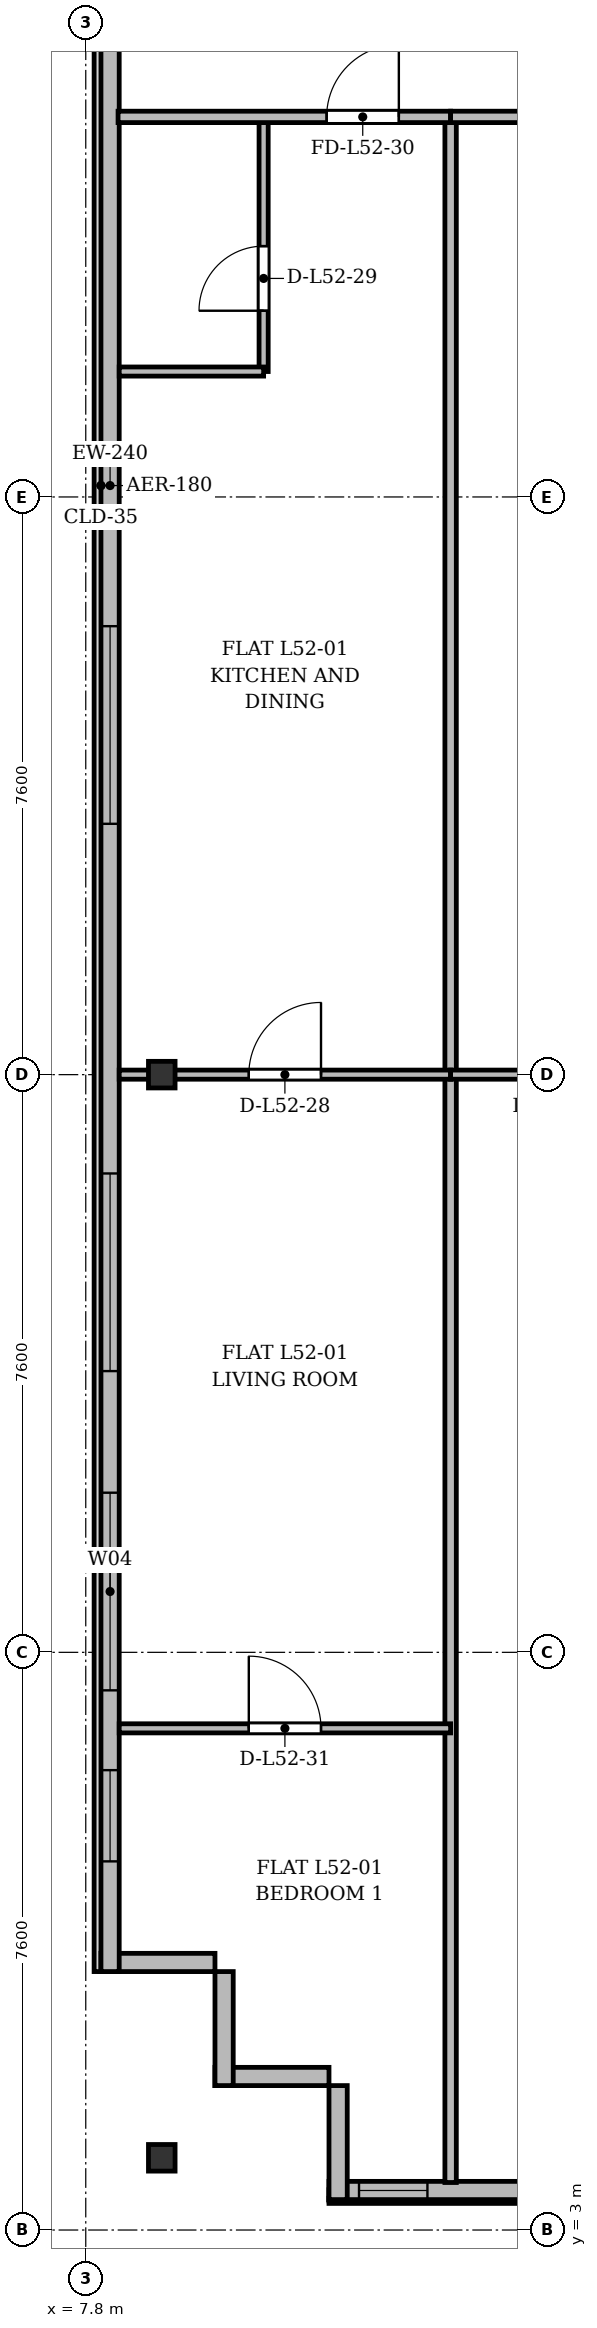
"""IFC4 building model, lengths in metres.
Left out: names, types, materials, properties, quantities, classifications, styles, units other than length and angle.
Written with IfcOpenShell. Run it as: python <this file> out.ifc"""

import sys

from ifc_helpers import new_model, si_unit, direction, frame, frame_2d, origin, origin_2d, place, context, subcontext, project, spatial, rectangle, i_section, extrude, source, transform, mapped, element, fill, save


model = new_model("IFC4")
c1 = context("Model", 3, precision=1e-05, world=origin(), true_north=direction((0.0, 1.0)))
c2 = subcontext(c1, "Body", "Model", "MODEL_VIEW")
j1 = project(units=[si_unit("LENGTHUNIT", "METRE"), si_unit("PLANEANGLEUNIT", "RADIAN")], contexts=[c1])
p1 = place(None, origin())
s1 = spatial("IfcSite", under=j1, at=p1, CompositionType="ELEMENT")
p2 = place(p1, origin())
s2 = spatial("IfcBuilding", under=s1, at=p2, CompositionType="ELEMENT")
p3 = place(p2, frame((0.0, 0.0, 201.3)))
s3 = spatial("IfcBuildingStorey", under=s2, at=p3, CompositionType="ELEMENT", Elevation=201.3)
m1 = source(origin(), c2, "Body", "SweptSolid", [
    extrude(i_section(OverallWidth=0.35, OverallDepth=0.35, WebThickness=0.018, FlangeThickness=0.028, at=origin_2d()), origin(), (0.0, 0.0, 1.0), 3.6),
])
for number, where, z_axis, x_axis in (
    (1, (8.8, 3.95, 0.0), (0.0, 0.0, 1.0), (1.0, 0.0, 0.0)),
    (2, (8.8, 18.2, 0.0), (0.0, 0.0, 1.0), (1.0, 0.0, 0.0)),
):
    element("IfcColumn", number, at=place(p3, frame(where, z_axis=z_axis, x_axis=x_axis)), inside=s3, PredefinedType="COLUMN", context=c2, shape_type="MappedRepresentation", body=[
        mapped(m1, transform((0.0, 0.0, 0.0), x_axis=(1.0, 0.0, 0.0), y_axis=(0.0, 1.0, 0.0), z_axis=(0.0, 0.0, 1.0), scale=1.0)),
    ])
for number, where, z_axis, x_axis in (
    (3, (11.0, 5.02, 0.0), (0.0, 0.0, 1.0), (-1.0, 0.0, 0.0)),
    (4, (9.62, 4.9, 0.0), (0.0, 0.0, 1.0), (0.0, 1.0, 0.0)),
):
    element("IfcWall", number, at=place(p3, frame(where, z_axis=z_axis, x_axis=x_axis)), inside=s3, PredefinedType="SOLIDWALL", context=c2, shape_type="SweptSolid", body=[
        extrude(rectangle(XDim=1.5, YDim=0.24, at=frame_2d((0.75, 0.0))), origin(), (0.0, 0.0, 1.0), 3.22),
    ])
p4 = place(p3, frame((9.5, 6.52, 0.0), z_axis=(0.0, 0.0, 1.0), x_axis=(-1.0, 0.0, 0.0)))
e5 = element("IfcWall", 5, at=p4, inside=s3, PredefinedType="SOLIDWALL", context=c2, shape_type="SweptSolid", body=[
    extrude(rectangle(XDim=1.5, YDim=0.24, at=frame_2d((0.75, 0.0))), origin(), (0.0, 0.0, 1.0), 2.72),
])
p5 = place(p3, frame((8.12, 6.4, 0.0), z_axis=(0.0, 0.0, 1.0), x_axis=(0.0, 1.0, 0.0)))
e6 = element("IfcWall", 6, at=p5, inside=s3, PredefinedType="SOLIDWALL", context=c2, shape_type="SweptSolid", body=[
    extrude(rectangle(XDim=39.1, YDim=0.24, at=frame_2d((19.55, 0.0))), origin(), (0.0, 0.0, 1.0), 3.22),
])
p6 = place(p5, frame((1.45, 0.0, 0.92)))
e7 = element("IfcOpeningElement", 7, at=p6, cuts=e6, PredefinedType="OPENING", context=c2, shape_type="SweptSolid", body=[
    extrude(rectangle(XDim=1.2, YDim=1.65, at=frame_2d((0.6, 0.825))), frame((0.0, 0.13, 0.0), z_axis=(0.0, -1.0, 0.0), x_axis=(1.0, 0.0, 0.0)), (0.0, 0.0, 1.0), 0.26),
])
p7 = place(p5, frame((3.7, 0.0, 0.92)))
e8 = element("IfcOpeningElement", 8, at=p7, cuts=e6, PredefinedType="OPENING", context=c2, shape_type="SweptSolid", body=[
    extrude(rectangle(XDim=2.6, YDim=1.9, at=frame_2d((1.3, 0.95))), frame((0.0, 0.13, 0.0), z_axis=(0.0, -1.0, 0.0), x_axis=(1.0, 0.0, 0.0)), (0.0, 0.0, 1.0), 0.26),
])
p8 = place(p5, frame((7.9, 0.0, 0.92)))
e9 = element("IfcOpeningElement", 9, at=p8, cuts=e6, PredefinedType="OPENING", context=c2, shape_type="SweptSolid", body=[
    extrude(rectangle(XDim=2.6, YDim=1.9, at=frame_2d((1.3, 0.95))), frame((0.0, 0.13, 0.0), z_axis=(0.0, -1.0, 0.0), x_axis=(1.0, 0.0, 0.0)), (0.0, 0.0, 1.0), 0.26),
])
p9 = place(p5, frame((15.1, 0.0, 0.92)))
e10 = element("IfcOpeningElement", 10, at=p9, cuts=e6, PredefinedType="OPENING", context=c2, shape_type="SweptSolid", body=[
    extrude(rectangle(XDim=2.6, YDim=1.9, at=frame_2d((1.3, 0.95))), frame((0.0, 0.13, 0.0), z_axis=(0.0, -1.0, 0.0), x_axis=(1.0, 0.0, 0.0)), (0.0, 0.0, 1.0), 0.26),
])
p10 = place(p5, frame((33.4, 0.0, 0.92)))
e11 = element("IfcOpeningElement", 11, at=p10, cuts=e6, PredefinedType="OPENING", context=c2, shape_type="SweptSolid", body=[
    extrude(rectangle(XDim=1.2, YDim=1.65, at=frame_2d((0.6, 0.825))), frame((0.0, 0.13, 0.0), z_axis=(0.0, -1.0, 0.0), x_axis=(1.0, 0.0, 0.0)), (0.0, 0.0, 1.0), 0.26),
])
p11 = place(p5, frame((36.75, 0.0, 0.92)))
e12 = element("IfcOpeningElement", 12, at=p11, cuts=e6, PredefinedType="OPENING", context=c2, shape_type="SweptSolid", body=[
    extrude(rectangle(XDim=1.2, YDim=1.65, at=frame_2d((0.6, 0.825))), frame((0.0, 0.13, 0.0), z_axis=(0.0, -1.0, 0.0), x_axis=(1.0, 0.0, 0.0)), (0.0, 0.0, 1.0), 0.26),
])
p12 = place(p3, frame((30.6, 3.52, 0.0), z_axis=(0.0, 0.0, 1.0), x_axis=(-1.0, 0.0, 0.0)))
e13 = element("IfcWall", 13, at=p12, inside=s3, PredefinedType="SOLIDWALL", context=c2, shape_type="SweptSolid", body=[
    extrude(rectangle(XDim=19.6, YDim=0.24, at=frame_2d((9.8, 0.0))), origin(), (0.0, 0.0, 1.0), 3.22),
])
p13 = place(p12, frame((1.695, 0.0, 0.9)))
e14 = element("IfcOpeningElement", 14, at=p13, cuts=e13, PredefinedType="OPENING", context=c2, shape_type="SweptSolid", body=[
    extrude(rectangle(XDim=1.5, YDim=1.75, at=frame_2d((0.75, 0.875))), frame((0.0, 0.13, 0.0), z_axis=(0.0, -1.0, 0.0), x_axis=(1.0, 0.0, 0.0)), (0.0, 0.0, 1.0), 0.26),
])
p14 = place(p12, frame((5.2, 0.0, 0.9)))
e15 = element("IfcOpeningElement", 15, at=p14, cuts=e13, PredefinedType="OPENING", context=c2, shape_type="SweptSolid", body=[
    extrude(rectangle(XDim=2.0, YDim=1.95, at=frame_2d((1.0, 0.975))), frame((0.0, 0.13, 0.0), z_axis=(0.0, -1.0, 0.0), x_axis=(1.0, 0.0, 0.0)), (0.0, 0.0, 1.0), 0.26),
])
p15 = place(p12, frame((8.175, 0.0, 0.9)))
e16 = element("IfcOpeningElement", 16, at=p15, cuts=e13, PredefinedType="OPENING", context=c2, shape_type="SweptSolid", body=[
    extrude(rectangle(XDim=1.65, YDim=1.85, at=frame_2d((0.825, 0.925))), frame((0.0, 0.13, 0.0), z_axis=(0.0, -1.0, 0.0), x_axis=(1.0, 0.0, 0.0)), (0.0, 0.0, 1.0), 0.26),
])
p16 = place(p12, frame((10.65, 0.0, 0.9)))
e17 = element("IfcOpeningElement", 17, at=p16, cuts=e13, PredefinedType="OPENING", context=c2, shape_type="SweptSolid", body=[
    extrude(rectangle(XDim=1.5, YDim=1.75, at=frame_2d((0.75, 0.875))), frame((0.0, 0.13, 0.0), z_axis=(0.0, -1.0, 0.0), x_axis=(1.0, 0.0, 0.0)), (0.0, 0.0, 1.0), 0.26),
])
p17 = place(p12, frame((14.1, 0.0, 0.9)))
e18 = element("IfcOpeningElement", 18, at=p17, cuts=e13, PredefinedType="OPENING", context=c2, shape_type="SweptSolid", body=[
    extrude(rectangle(XDim=2.2, YDim=1.8, at=frame_2d((1.1, 0.9))), frame((0.0, 0.13, 0.0), z_axis=(0.0, -1.0, 0.0), x_axis=(1.0, 0.0, 0.0)), (0.0, 0.0, 1.0), 0.26),
])
p18 = place(p12, frame((18.305, 0.0, 0.9)))
e19 = element("IfcOpeningElement", 19, at=p18, cuts=e13, PredefinedType="OPENING", context=c2, shape_type="SweptSolid", body=[
    extrude(rectangle(XDim=0.9, YDim=1.65, at=frame_2d((0.45, 0.825))), frame((0.0, 0.13, 0.0), z_axis=(0.0, -1.0, 0.0), x_axis=(1.0, 0.0, 0.0)), (0.0, 0.0, 1.0), 0.26),
])
p19 = place(p3, frame((11.12, 3.4, 0.0), z_axis=(0.0, 0.0, 1.0), x_axis=(0.0, 1.0, 0.0)))
e20 = element("IfcWall", 20, at=p19, inside=s3, PredefinedType="SOLIDWALL", context=c2, shape_type="SweptSolid", body=[
    extrude(rectangle(XDim=1.5, YDim=0.24, at=frame_2d((0.75, 0.0))), origin(), (0.0, 0.0, 1.0), 2.77),
])
p20 = place(p3, frame((12.6, 3.625, 0.0), z_axis=(0.0, 0.0, 1.0), x_axis=(0.0, 1.0, 0.0)))
e21 = element("IfcWall", 21, at=p20, inside=s3, PredefinedType="PARTITIONING", context=c2, shape_type="SweptSolid", body=[
    extrude(rectangle(XDim=27.175, YDim=0.15, at=frame_2d((13.587, 0.0))), origin(), (0.0, 0.0, 1.0), 2.77),
])
p21 = place(p3, frame((8.24, 18.2, 0.0), z_axis=(0.0, 0.0, 1.0), x_axis=(1.0, 0.0, 0.0)))
e22 = element("IfcWall", 22, at=p21, inside=s3, PredefinedType="PARTITIONING", context=c2, shape_type="SweptSolid", body=[
    extrude(rectangle(XDim=4.36, YDim=0.12, at=frame_2d((2.18, 0.0))), origin(), (0.0, 0.0, 1.0), 2.77),
])
p22 = place(p21, frame((1.705, 0.0, 0.0)))
e23 = element("IfcOpeningElement", 23, at=p22, cuts=e22, PredefinedType="OPENING", context=c2, shape_type="SweptSolid", body=[
    extrude(rectangle(XDim=0.95, YDim=2.15, at=frame_2d((0.475, 1.075))), frame((0.0, 0.07, 0.0), z_axis=(0.0, -1.0, 0.0), x_axis=(1.0, 0.0, 0.0)), (0.0, 0.0, 1.0), 0.14),
])
p23 = place(p3, frame((10.14, 27.45, 0.0), z_axis=(0.0, 0.0, 1.0), x_axis=(0.0, 1.0, 0.0)))
e24 = element("IfcWall", 24, at=p23, inside=s3, PredefinedType="PARTITIONING", context=c2, shape_type="SweptSolid", body=[
    extrude(rectangle(XDim=3.35, YDim=0.12, at=frame_2d((1.675, 0.0))), origin(), (0.0, 0.0, 1.0), 3.22),
])
p24 = place(p23, frame((0.8, 0.0, 0.0)))
e25 = element("IfcOpeningElement", 25, at=p24, cuts=e24, PredefinedType="OPENING", context=c2, shape_type="SweptSolid", body=[
    extrude(rectangle(XDim=0.85, YDim=2.1, at=frame_2d((0.425, 1.05))), frame((0.0, 0.07, 0.0), z_axis=(0.0, -1.0, 0.0), x_axis=(1.0, 0.0, 0.0)), (0.0, 0.0, 1.0), 0.14),
])
p25 = place(p3, frame((8.24, 27.45, 0.0), z_axis=(0.0, 0.0, 1.0), x_axis=(1.0, 0.0, 0.0)))
e26 = element("IfcWall", 26, at=p25, inside=s3, PredefinedType="PARTITIONING", context=c2, shape_type="SweptSolid", body=[
    extrude(rectangle(XDim=1.9, YDim=0.12, at=frame_2d((0.95, 0.0))), origin(), (0.0, 0.0, 1.0), 2.72),
])
p26 = place(p3, frame((8.225, 30.8, 0.0), z_axis=(0.0, 0.0, 1.0), x_axis=(1.0, 0.0, 0.0)))
e27 = element("IfcWall", 27, at=p26, inside=s3, PredefinedType="PARTITIONING", context=c2, shape_type="SweptSolid", body=[
    extrude(rectangle(XDim=4.375, YDim=0.15, at=frame_2d((2.188, 0.0))), origin(), (0.0, 0.0, 1.0), 2.72),
])
p27 = place(p26, frame((2.744, 0.0, 0.0)))
e28 = element("IfcOpeningElement", 28, at=p27, cuts=e27, PredefinedType="OPENING", context=c2, shape_type="SweptSolid", body=[
    extrude(rectangle(XDim=0.95, YDim=2.15, at=frame_2d((0.475, 1.075))), frame((0.0, 0.085, 0.0), z_axis=(0.0, -1.0, 0.0), x_axis=(1.0, 0.0, 0.0)), (0.0, 0.0, 1.0), 0.17),
])
p28 = place(p3, frame((8.24, 9.6, 0.0), z_axis=(0.0, 0.0, 1.0), x_axis=(1.0, 0.0, 0.0)))
e29 = element("IfcWall", 29, at=p28, inside=s3, PredefinedType="PARTITIONING", context=c2, shape_type="SweptSolid", body=[
    extrude(rectangle(XDim=4.36, YDim=0.12, at=frame_2d((2.18, 0.0))), origin(), (0.0, 0.0, 1.0), 2.72),
])
p29 = place(p28, frame((1.705, 0.0, 0.0)))
e30 = element("IfcOpeningElement", 30, at=p29, cuts=e29, PredefinedType="OPENING", context=c2, shape_type="SweptSolid", body=[
    extrude(rectangle(XDim=0.95, YDim=2.15, at=frame_2d((0.475, 1.075))), frame((0.0, 0.07, 0.0), z_axis=(0.0, -1.0, 0.0), x_axis=(1.0, 0.0, 0.0)), (0.0, 0.0, 1.0), 0.14),
])
p30 = place(p3, frame((12.6, 30.8, 0.0), z_axis=(0.0, 0.0, 1.0), x_axis=(1.0, 0.0, 0.0)))
e31 = element("IfcWall", 31, at=p30, inside=s3, PredefinedType="PARTITIONING", context=c2, shape_type="SweptSolid", body=[
    extrude(rectangle(XDim=5.6, YDim=0.15, at=frame_2d((2.8, 0.0))), origin(), (0.0, 0.0, 1.0), 2.72),
])
p31 = place(p30, frame((2.232, 0.0, 0.0)))
e32 = element("IfcOpeningElement", 32, at=p31, cuts=e31, PredefinedType="OPENING", context=c2, shape_type="SweptSolid", body=[
    extrude(rectangle(XDim=0.95, YDim=2.15, at=frame_2d((0.475, 1.075))), frame((0.0, 0.085, 0.0), z_axis=(0.0, -1.0, 0.0), x_axis=(1.0, 0.0, 0.0)), (0.0, 0.0, 1.0), 0.17),
])
p32 = place(p3, frame((12.6, 18.2, 0.0), z_axis=(0.0, 0.0, 1.0), x_axis=(1.0, 0.0, 0.0)))
e33 = element("IfcWall", 33, at=p32, inside=s3, PredefinedType="PARTITIONING", context=c2, shape_type="SweptSolid", body=[
    extrude(rectangle(XDim=5.6, YDim=0.12, at=frame_2d((2.8, 0.0))), origin(), (0.0, 0.0, 1.0), 2.77),
])
p33 = place(p32, frame((0.936, 0.0, 0.0)))
e34 = element("IfcOpeningElement", 34, at=p33, cuts=e33, PredefinedType="OPENING", context=c2, shape_type="SweptSolid", body=[
    extrude(rectangle(XDim=0.95, YDim=2.15, at=frame_2d((0.475, 1.075))), frame((0.0, 0.07, 0.0), z_axis=(0.0, -1.0, 0.0), x_axis=(1.0, 0.0, 0.0)), (0.0, 0.0, 1.0), 0.14),
])
m2 = source(origin(), c2, "Body", "SweptSolid", [
    extrude(rectangle(XDim=1.2, YDim=1.65, at=frame_2d((0.6, 0.825))), frame((0.0, 0.03, 0.0), z_axis=(0.0, -1.0, 0.0), x_axis=(1.0, 0.0, 0.0)), (0.0, 0.0, 1.0), 0.06),
])
p34 = place(p6, origin())
e35 = element("IfcWindow", 35, at=p34, inside=s3, PartitioningType="SINGLE_PANEL", PredefinedType="WINDOW", context=c2, shape_type="MappedRepresentation", body=[
    mapped(m2, transform((0.0, 0.0, 0.0), x_axis=(1.0, 0.0, 0.0), y_axis=(0.0, 1.0, 0.0), z_axis=(0.0, 0.0, 1.0), scale=1.0)),
])
fill(e7, e35)
m3 = source(origin(), c2, "Body", "SweptSolid", [
    extrude(rectangle(XDim=2.6, YDim=1.9, at=frame_2d((1.3, 0.95))), frame((0.0, 0.03, 0.0), z_axis=(0.0, -1.0, 0.0), x_axis=(1.0, 0.0, 0.0)), (0.0, 0.0, 1.0), 0.06),
])
p35 = place(p7, origin())
e36 = element("IfcWindow", 36, at=p35, inside=s3, PartitioningType="SINGLE_PANEL", PredefinedType="WINDOW", context=c2, shape_type="MappedRepresentation", body=[
    mapped(m3, transform((0.0, 0.0, 0.0), x_axis=(1.0, 0.0, 0.0), y_axis=(0.0, 1.0, 0.0), z_axis=(0.0, 0.0, 1.0), scale=1.0)),
])
fill(e8, e36)
p36 = place(p8, origin())
e37 = element("IfcWindow", 37, at=p36, inside=s3, PartitioningType="SINGLE_PANEL", PredefinedType="WINDOW", context=c2, shape_type="MappedRepresentation", body=[
    mapped(m3, transform((0.0, 0.0, 0.0), x_axis=(1.0, 0.0, 0.0), y_axis=(0.0, 1.0, 0.0), z_axis=(0.0, 0.0, 1.0), scale=1.0)),
])
fill(e9, e37)
p37 = place(p9, origin())
e38 = element("IfcWindow", 38, at=p37, inside=s3, PartitioningType="SINGLE_PANEL", PredefinedType="WINDOW", context=c2, shape_type="MappedRepresentation", body=[
    mapped(m3, transform((0.0, 0.0, 0.0), x_axis=(1.0, 0.0, 0.0), y_axis=(0.0, 1.0, 0.0), z_axis=(0.0, 0.0, 1.0), scale=1.0)),
])
fill(e10, e38)
m4 = source(origin(), c2, "Body", "SweptSolid", [
    extrude(rectangle(XDim=0.9, YDim=1.65, at=frame_2d((0.45, 0.825))), frame((0.0, 0.03, 0.0), z_axis=(0.0, -1.0, 0.0), x_axis=(1.0, 0.0, 0.0)), (0.0, 0.0, 1.0), 0.06),
])
p38 = place(p18, origin())
e39 = element("IfcWindow", 39, at=p38, inside=s3, PartitioningType="SINGLE_PANEL", PredefinedType="WINDOW", context=c2, shape_type="MappedRepresentation", body=[
    mapped(m4, transform((0.0, 0.0, 0.0), x_axis=(1.0, 0.0, 0.0), y_axis=(0.0, 1.0, 0.0), z_axis=(0.0, 0.0, 1.0), scale=1.0)),
])
fill(e19, e39)
m5 = source(origin(), c2, "Body", "SweptSolid", [
    extrude(rectangle(XDim=0.95, YDim=2.15, at=frame_2d((0.475, 1.075))), frame((0.0, 0.025, 0.0), z_axis=(0.0, -1.0, 0.0), x_axis=(1.0, 0.0, 0.0)), (0.0, 0.0, 1.0), 0.05),
])
p39 = place(p22, origin())
e40 = element("IfcDoor", 40, at=p39, inside=s3, OperationType="SINGLE_SWING_RIGHT", PredefinedType="DOOR", context=c2, shape_type="MappedRepresentation", body=[
    mapped(m5, transform((0.0, 0.0, 0.0), x_axis=(1.0, 0.0, 0.0), y_axis=(0.0, 1.0, 0.0), z_axis=(0.0, 0.0, 1.0), scale=1.0)),
])
fill(e23, e40)
m6 = source(origin(), c2, "Body", "SweptSolid", [
    extrude(rectangle(XDim=0.85, YDim=2.1, at=frame_2d((0.425, 1.05))), frame((0.0, 0.025, 0.0), z_axis=(0.0, -1.0, 0.0), x_axis=(1.0, 0.0, 0.0)), (0.0, 0.0, 1.0), 0.05),
])
p40 = place(p24, origin())
e41 = element("IfcDoor", 41, at=p40, inside=s3, OperationType="SINGLE_SWING_LEFT", PredefinedType="DOOR", context=c2, shape_type="MappedRepresentation", body=[
    mapped(m6, transform((0.0, 0.0, 0.0), x_axis=(1.0, 0.0, 0.0), y_axis=(0.0, 1.0, 0.0), z_axis=(0.0, 0.0, 1.0), scale=1.0)),
])
fill(e25, e41)
p41 = place(p27, origin())
e42 = element("IfcDoor", 42, at=p41, inside=s3, OperationType="SINGLE_SWING_RIGHT", PredefinedType="DOOR", context=c2, shape_type="MappedRepresentation", body=[
    mapped(m5, transform((0.0, 0.0, 0.0), x_axis=(1.0, 0.0, 0.0), y_axis=(0.0, 1.0, 0.0), z_axis=(0.0, 0.0, 1.0), scale=1.0)),
])
fill(e28, e42)
p42 = place(p29, origin())
e43 = element("IfcDoor", 43, at=p42, inside=s3, OperationType="SINGLE_SWING_LEFT", PredefinedType="DOOR", context=c2, shape_type="MappedRepresentation", body=[
    mapped(m5, transform((0.0, 0.0, 0.0), x_axis=(1.0, 0.0, 0.0), y_axis=(0.0, 1.0, 0.0), z_axis=(0.0, 0.0, 1.0), scale=1.0)),
])
fill(e30, e43)
save(model, sys.argv[1])
